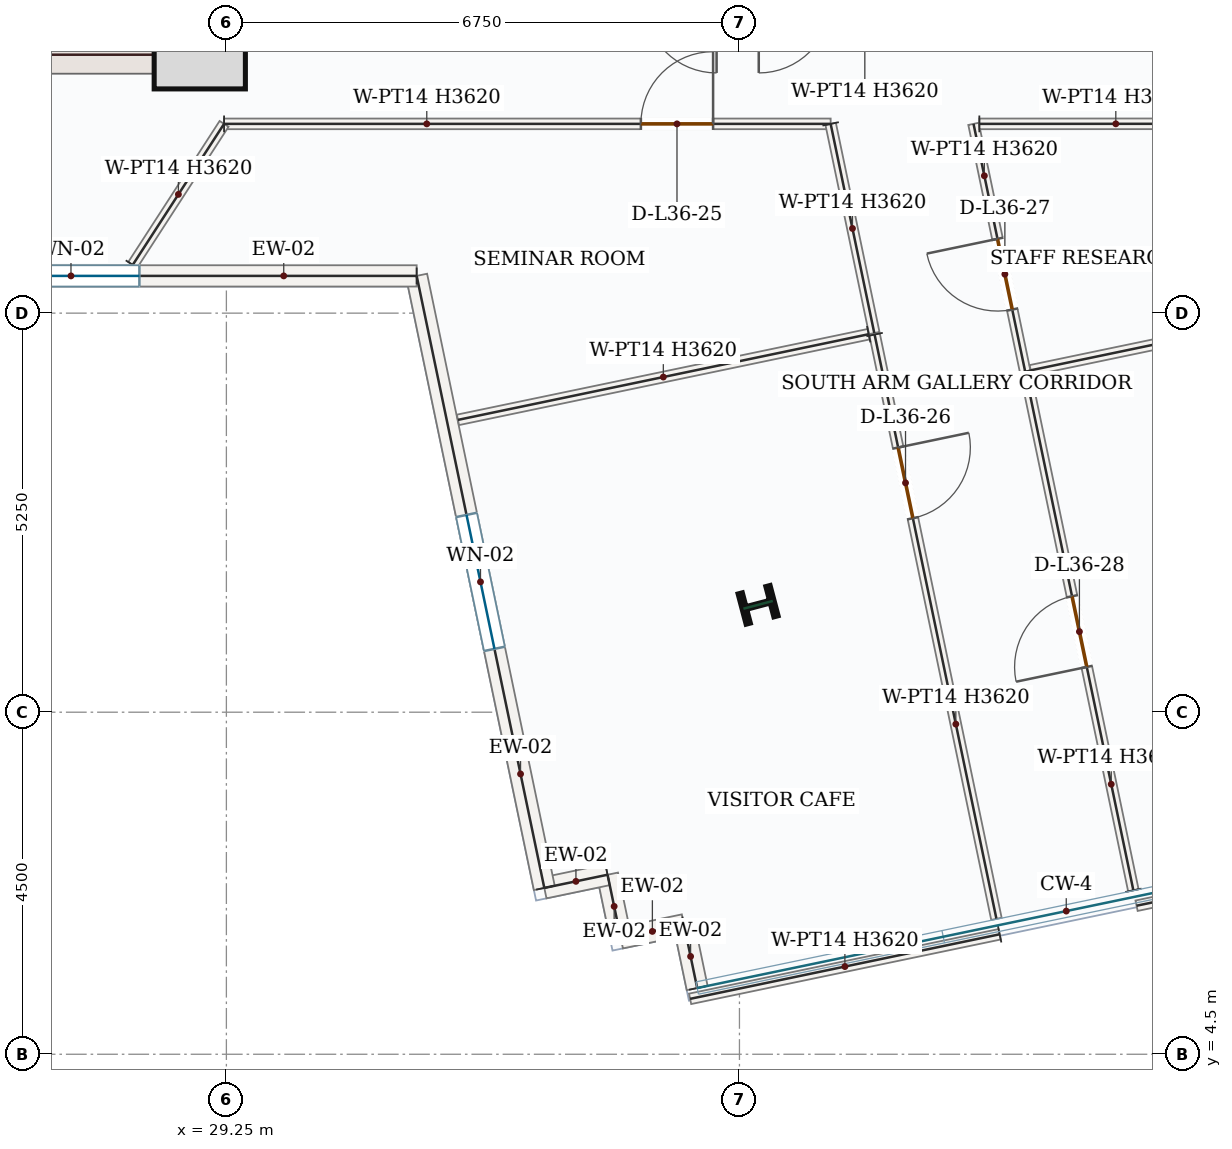
"""IFC4 building model, lengths in metres.
Left out: names, types, materials, properties, quantities, classifications, styles, units other than length and angle.
Written with IfcOpenShell. Run it as: python <this file> out.ifc"""

import sys

from ifc_helpers import new_model, si_unit, direction, frame, frame_2d, origin, origin_2d, place, context, subcontext, project, spatial, rectangle, i_section, extrude, source, transform, mapped, element, fill, save


model = new_model("IFC4")
c1 = context("Model", 3, precision=1e-05, world=origin(), true_north=direction((0.0, 1.0)))
c2 = subcontext(c1, "Body", "Model", "MODEL_VIEW")
j1 = project(units=[si_unit("LENGTHUNIT", "METRE"), si_unit("PLANEANGLEUNIT", "RADIAN")], contexts=[c1])
p1 = place(None, origin())
s1 = spatial("IfcSite", under=j1, at=p1, CompositionType="ELEMENT")
p2 = place(p1, origin())
s2 = spatial("IfcBuilding", under=s1, at=p2, CompositionType="ELEMENT")
p3 = place(p2, frame((0.0, 0.0, 159.0)))
s3 = spatial("IfcBuildingStorey", under=s2, at=p3, CompositionType="ELEMENT", Elevation=159.0)
p4 = place(p3, frame((29.0, 17.4, 0.0), z_axis=(0.0, 0.0, 1.0), x_axis=(0.0, 1.0, 0.0)))
e1 = element("IfcWall", 1, at=p4, inside=s3, PredefinedType="SHEAR", context=c2, shape_type="SweptSolid", body=[
    extrude(rectangle(XDim=8.55, YDim=0.5, at=frame_2d((4.275, 0.0))), origin(), (0.0, 0.0, 1.0), 3.62),
])
p5 = place(p4, frame((6.65, 0.0, 0.0)))
e2 = element("IfcOpeningElement", 2, at=p5, cuts=e1, PredefinedType="OPENING", context=c2, shape_type="SweptSolid", body=[
    extrude(rectangle(XDim=1.1, YDim=2.2, at=frame_2d((0.55, 1.1))), frame((0.0, 0.26, 0.0), z_axis=(0.0, -1.0, 0.0), x_axis=(1.0, 0.0, 0.0)), (0.0, 0.0, 1.0), 0.52),
])
p6 = place(p4, frame((2.15, 0.0, 0.0)))
e3 = element("IfcOpeningElement", 3, at=p6, cuts=e1, PredefinedType="OPENING", context=c2, shape_type="SweptSolid", body=[
    extrude(rectangle(XDim=0.88, YDim=2.1, at=frame_2d((0.44, 1.05))), frame((0.0, 0.26, 0.0), z_axis=(0.0, -1.0, 0.0), x_axis=(1.0, 0.0, 0.0)), (0.0, 0.0, 1.0), 0.52),
])
p7 = place(p4, frame((4.25, 0.0, 0.0)))
e4 = element("IfcOpeningElement", 4, at=p7, cuts=e1, PredefinedType="OPENING", context=c2, shape_type="SweptSolid", body=[
    extrude(rectangle(XDim=0.88, YDim=2.1, at=frame_2d((0.44, 1.05))), frame((0.0, 0.26, 0.0), z_axis=(0.0, -1.0, 0.0), x_axis=(1.0, 0.0, 0.0)), (0.0, 0.0, 1.0), 0.52),
])
m1 = source(origin(), c2, "Body", "SweptSolid", [
    extrude(rectangle(XDim=7.0, YDim=0.5, at=frame_2d((3.5, 0.0))), origin(), (0.0, 0.0, 1.0), 3.62),
])
p8 = place(p3, frame((21.75, 17.65, 0.0), z_axis=(0.0, 0.0, 1.0), x_axis=(1.0, 0.0, 0.0)))
e5 = element("IfcWall", 5, at=p8, inside=s3, PredefinedType="SHEAR", context=c2, shape_type="MappedRepresentation", body=[
    mapped(m1, transform((0.0, 0.0, 0.0), x_axis=(1.0, 0.0, 0.0), y_axis=(0.0, 1.0, 0.0), z_axis=(0.0, 0.0, 1.0), scale=1.0)),
])
m2 = source(origin(), c2, "Body", "SweptSolid", [
    extrude(rectangle(XDim=1.2, YDim=1.2, at=origin_2d()), origin(), (0.0, 0.0, 1.0), 3.9),
])
p9 = place(p3, frame((28.9, 17.8, 0.0), z_axis=(0.0, 0.0, 1.0), x_axis=(1.0, 0.0, 0.0)))
e6 = element("IfcColumn", 6, at=p9, inside=s3, PredefinedType="COLUMN", context=c2, shape_type="MappedRepresentation", body=[
    mapped(m2, transform((0.0, 0.0, 0.0), x_axis=(1.0, 0.0, 0.0), y_axis=(0.0, 1.0, 0.0), z_axis=(0.0, 0.0, 1.0), scale=1.0)),
])
m3 = source(origin(), c2, "Body", "SweptSolid", [
    extrude(i_section(OverallWidth=0.412, OverallDepth=0.435, WebThickness=0.036, FlangeThickness=0.057, FilletRadius=0.018, at=origin_2d()), origin(), (0.0, 0.0, 1.0), 3.9),
])
p10 = place(p3, frame((36.245, 10.412, 0.0), z_axis=(0.0, 0.0, 1.0), x_axis=(-0.255445757936, 0.966823388604, 0.0)))
e7 = element("IfcColumn", 7, at=p10, inside=s3, PredefinedType="COLUMN", context=c2, shape_type="MappedRepresentation", body=[
    mapped(m3, transform((0.0, 0.0, 0.0), x_axis=(1.0, 0.0, 0.0), y_axis=(0.0, 1.0, 0.0), z_axis=(0.0, 0.0, 1.0), scale=1.0)),
])
m4 = source(origin(), c2, "Body", "SweptSolid", [
    extrude(rectangle(XDim=0.85, YDim=0.28, at=frame_2d((0.425, 0.0))), origin(), (0.0, 0.0, 1.0), 3.62),
])
for number, where, z_axis, x_axis in (
    (8, (35.444, 5.371, 0.0), (0.0, 0.0, 1.0), (-0.204, 0.979, 0.0)),
    (9, (35.271, 6.203, 0.0), (0.0, 0.0, 1.0), (-0.979, -0.204, 0.0)),
    (10, (34.438, 6.03, 0.0), (0.0, 0.0, 1.0), (-0.204, 0.979, 0.0)),
):
    element("IfcWall", number, at=place(p3, frame(where, z_axis=z_axis, x_axis=x_axis)), inside=s3, PredefinedType="SOLIDWALL", context=c2, shape_type="MappedRepresentation", body=[
        mapped(m4, transform((0.0, 0.0, 0.0), x_axis=(1.0, 0.0, 0.0), y_axis=(0.0, 1.0, 0.0), z_axis=(0.0, 0.0, 1.0), scale=1.0)),
    ])
m5 = source(origin(), c2, "Body", "SweptSolid", [
    extrude(rectangle(XDim=0.85, YDim=0.28, at=frame_2d((0.425, 0.0))), origin(), (0.0, 0.0, 1.0), 3.62),
])
p11 = place(p3, frame((34.265, 6.862, 0.0), z_axis=(0.0, 0.0, 1.0), x_axis=(-0.97893500384, -0.204172128991, 0.0)))
e11 = element("IfcWall", 11, at=p11, inside=s3, PredefinedType="SOLIDWALL", context=c2, shape_type="MappedRepresentation", body=[
    mapped(m5, transform((0.0, 0.0, 0.0), x_axis=(1.0, 0.0, 0.0), y_axis=(0.0, 1.0, 0.0), z_axis=(0.0, 0.0, 1.0), scale=1.0)),
])
p12 = place(p3, frame((33.433, 6.688, 0.0), z_axis=(0.0, 0.0, 1.0), x_axis=(-0.204152195211, 0.978939161128, 0.0)))
e12 = element("IfcWall", 12, at=p12, inside=s3, PredefinedType="SOLIDWALL", context=c2, shape_type="SweptSolid", body=[
    extrude(rectangle(XDim=8.225, YDim=0.28, at=frame_2d((4.113, 0.0))), origin(), (0.0, 0.0, 1.0), 3.62),
])
p13 = place(p12, frame((3.213, 0.0, 0.85)))
e13 = element("IfcOpeningElement", 13, at=p13, cuts=e12, PredefinedType="OPENING", context=c2, shape_type="SweptSolid", body=[
    extrude(rectangle(XDim=1.8, YDim=1.75, at=frame_2d((0.9, 0.875))), frame((0.0, 0.15, 0.0), z_axis=(0.0, -1.0, 0.0), x_axis=(1.0, 0.0, 0.0)), (0.0, 0.0, 1.0), 0.3),
])
p14 = place(p3, frame((31.753, 14.74, 0.0), z_axis=(0.0, 0.0, 1.0), x_axis=(-1.0, 0.0, 0.0)))
e14 = element("IfcWall", 14, at=p14, inside=s3, PredefinedType="SOLIDWALL", context=c2, shape_type="SweptSolid", body=[
    extrude(rectangle(XDim=9.095, YDim=0.28, at=frame_2d((4.548, 0.0))), origin(), (0.0, 0.0, 1.0), 3.62),
])
p15 = place(p14, frame((3.648, 0.0, 0.85)))
e15 = element("IfcOpeningElement", 15, at=p15, cuts=e14, PredefinedType="OPENING", context=c2, shape_type="SweptSolid", body=[
    extrude(rectangle(XDim=1.8, YDim=1.75, at=frame_2d((0.9, 0.875))), frame((0.0, 0.15, 0.0), z_axis=(0.0, -1.0, 0.0), x_axis=(1.0, 0.0, 0.0)), (0.0, 0.0, 1.0), 0.3),
])
p16 = place(p3, frame((29.219, 16.74, 0.0), z_axis=(0.0, 0.0, 1.0), x_axis=(1.0, 0.0, 0.0)))
e16 = element("IfcWall", 16, at=p16, inside=s3, PredefinedType="PARTITIONING", context=c2, shape_type="SweptSolid", body=[
    extrude(rectangle(XDim=7.98, YDim=0.14, at=frame_2d((3.99, 0.0))), origin(), (0.0, 0.0, 1.0), 3.62),
])
p17 = place(p16, frame((5.484, 0.0, 0.0)))
e17 = element("IfcOpeningElement", 17, at=p17, cuts=e16, PredefinedType="OPENING", context=c2, shape_type="SweptSolid", body=[
    extrude(rectangle(XDim=0.95, YDim=2.15, at=frame_2d((0.475, 1.075))), frame((0.0, 0.08, 0.0), z_axis=(0.0, -1.0, 0.0), x_axis=(1.0, 0.0, 0.0)), (0.0, 0.0, 1.0), 0.16),
])
m6 = source(origin(), c2, "Body", "SweptSolid", [
    extrude(rectangle(XDim=2.811, YDim=0.14, at=frame_2d((1.406, 0.0))), origin(), (0.0, 0.0, 1.0), 3.62),
])
p18 = place(p3, frame((37.2, 16.74, 0.0), z_axis=(0.0, 0.0, 1.0), x_axis=(0.204092977776, -0.978951508719, 0.0)))
e18 = element("IfcWall", 18, at=p18, inside=s3, PredefinedType="PARTITIONING", context=c2, shape_type="MappedRepresentation", body=[
    mapped(m6, transform((0.0, 0.0, 0.0), x_axis=(1.0, 0.0, 0.0), y_axis=(0.0, 1.0, 0.0), z_axis=(0.0, 0.0, 1.0), scale=1.0)),
])
m7 = source(origin(), c2, "Body", "SweptSolid", [
    extrude(rectangle(XDim=5.52, YDim=0.14, at=frame_2d((2.76, 0.0))), origin(), (0.0, 0.0, 1.0), 3.62),
])
p19 = place(p3, frame((37.7, 13.973, 0.0), z_axis=(0.0, 0.0, 1.0), x_axis=(-0.978929612498, -0.204197976909, 0.0)))
e19 = element("IfcWall", 19, at=p19, inside=s3, PredefinedType="PARTITIONING", context=c2, shape_type="MappedRepresentation", body=[
    mapped(m7, transform((0.0, 0.0, 0.0), x_axis=(1.0, 0.0, 0.0), y_axis=(0.0, 1.0, 0.0), z_axis=(0.0, 0.0, 1.0), scale=1.0)),
])
m8 = source(origin(), c2, "Body", "SweptSolid", [
    extrude(rectangle(XDim=2.21, YDim=0.14, at=frame_2d((1.105, 0.0))), origin(), (0.0, 0.0, 1.0), 3.62),
])
p20 = place(p3, frame((28.018, 14.885, 0.0), z_axis=(0.0, 0.0, 1.0), x_axis=(0.543613077793, 0.83933594088, 0.0)))
e20 = element("IfcWall", 20, at=p20, inside=s3, PredefinedType="PARTITIONING", context=c2, shape_type="MappedRepresentation", body=[
    mapped(m8, transform((0.0, 0.0, 0.0), x_axis=(1.0, 0.0, 0.0), y_axis=(0.0, 1.0, 0.0), z_axis=(0.0, 0.0, 1.0), scale=1.0)),
])
p21 = place(p3, frame((39.759, 13.483, 0.0), z_axis=(0.0, 0.0, 1.0), x_axis=(-0.204124193585, 0.97894500029, 0.0)))
e21 = element("IfcWall", 21, at=p21, inside=s3, PredefinedType="PARTITIONING", context=c2, shape_type="SweptSolid", body=[
    extrude(rectangle(XDim=3.327, YDim=0.14, at=frame_2d((1.664, 0.0))), origin(), (0.0, 0.0, 1.0), 3.62),
])
p22 = place(p21, frame((0.832, 0.0, 0.0)))
e22 = element("IfcOpeningElement", 22, at=p22, cuts=e21, PredefinedType="OPENING", context=c2, shape_type="SweptSolid", body=[
    extrude(rectangle(XDim=0.95, YDim=2.15, at=frame_2d((0.475, 1.075))), frame((0.0, 0.08, 0.0), z_axis=(0.0, -1.0, 0.0), x_axis=(1.0, 0.0, 0.0)), (0.0, 0.0, 1.0), 0.16),
])
m9 = source(origin(), c2, "Body", "SweptSolid", [
    extrude(rectangle(XDim=3.591, YDim=0.14, at=frame_2d((1.795, 0.0))), origin(), (0.0, 0.0, 1.0), 3.079),
])
p23 = place(p3, frame((39.156, 16.74, 0.0), z_axis=(0.0, 0.0, 1.0), x_axis=(0.999999942209, 0.000339974142, 0.0)))
e23 = element("IfcWall", 23, at=p23, inside=s3, PredefinedType="PARTITIONING", context=c2, shape_type="MappedRepresentation", body=[
    mapped(m9, transform((0.0, 0.0, 0.0), x_axis=(1.0, 0.0, 0.0), y_axis=(0.0, 1.0, 0.0), z_axis=(0.0, 0.0, 1.0), scale=1.0)),
])
m10 = source(origin(), c2, "Body", "SweptSolid", [
    extrude(rectangle(XDim=5.52, YDim=0.14, at=frame_2d((2.76, 0.0))), origin(), (0.0, 0.0, 1.0), 3.079),
])
p24 = place(p3, frame((45.236, 14.625, 0.0), z_axis=(0.0, 0.0, 1.0), x_axis=(-0.97893845252, -0.204155593062, 0.0)))
e24 = element("IfcWall", 24, at=p24, inside=s3, PredefinedType="PARTITIONING", context=c2, shape_type="MappedRepresentation", body=[
    mapped(m10, transform((0.0, 0.0, 0.0), x_axis=(1.0, 0.0, 0.0), y_axis=(0.0, 1.0, 0.0), z_axis=(0.0, 0.0, 1.0), scale=1.0)),
])
m11 = source(origin(), c2, "Body", "SweptSolid", [
    extrude(rectangle(XDim=4.16, YDim=0.14, at=frame_2d((2.08, 0.0))), origin(), (0.0, 0.0, 1.0), 3.62),
])
p25 = place(p3, frame((45.297, 7.303, 0.0), z_axis=(0.0, 0.0, 1.0), x_axis=(-0.978935967244, -0.204167509744, 0.0)))
e25 = element("IfcWall", 25, at=p25, inside=s3, PredefinedType="PARTITIONING", context=c2, shape_type="MappedRepresentation", body=[
    mapped(m11, transform((0.0, 0.0, 0.0), x_axis=(1.0, 0.0, 0.0), y_axis=(0.0, 1.0, 0.0), z_axis=(0.0, 0.0, 1.0), scale=1.0)),
])
p26 = place(p3, frame((41.182, 6.657, 0.0), z_axis=(0.0, 0.0, 1.0), x_axis=(-0.204158980406, 0.97893774609, 0.0)))
e26 = element("IfcWall", 26, at=p26, inside=s3, PredefinedType="PARTITIONING", context=c2, shape_type="SweptSolid", body=[
    extrude(rectangle(XDim=6.953, YDim=0.14, at=frame_2d((3.476, 0.0))), origin(), (0.0, 0.0, 1.0), 3.62),
])
p27 = place(p26, frame((3.001, 0.0, 0.0)))
e27 = element("IfcOpeningElement", 27, at=p27, cuts=e26, PredefinedType="OPENING", context=c2, shape_type="SweptSolid", body=[
    extrude(rectangle(XDim=0.95, YDim=2.15, at=frame_2d((0.475, 1.075))), frame((0.0, 0.08, 0.0), z_axis=(0.0, -1.0, 0.0), x_axis=(1.0, 0.0, 0.0)), (0.0, 0.0, 1.0), 0.16),
])
p28 = place(p3, frame((37.778, 13.969, 0.0), z_axis=(0.0, 0.0, 1.0), x_axis=(0.204175249208, -0.978934353065, 0.0)))
e28 = element("IfcWall", 28, at=p28, inside=s3, PredefinedType="PARTITIONING", context=c2, shape_type="SweptSolid", body=[
    extrude(rectangle(XDim=7.853, YDim=0.14, at=frame_2d((3.926, 0.0))), origin(), (0.0, 0.0, 1.0), 3.62),
])
p29 = place(p28, frame((1.519, 0.0, 0.0)))
e29 = element("IfcOpeningElement", 29, at=p29, cuts=e28, PredefinedType="OPENING", context=c2, shape_type="SweptSolid", body=[
    extrude(rectangle(XDim=0.95, YDim=2.15, at=frame_2d((0.475, 1.075))), frame((0.0, 0.08, 0.0), z_axis=(0.0, -1.0, 0.0), x_axis=(1.0, 0.0, 0.0)), (0.0, 0.0, 1.0), 0.16),
])
m12 = source(origin(), c2, "Body", "SweptSolid", [
    extrude(rectangle(XDim=4.16, YDim=0.14, at=frame_2d((2.08, 0.0))), origin(), (0.0, 0.0, 1.0), 3.62),
])
p30 = place(p3, frame((39.423, 6.078, 0.0), z_axis=(0.0, 0.0, 1.0), x_axis=(-0.978945249929, -0.204122996358, 0.0)))
e30 = element("IfcWall", 30, at=p30, inside=s3, PredefinedType="PARTITIONING", context=c2, shape_type="MappedRepresentation", body=[
    mapped(m12, transform((0.0, 0.0, 0.0), x_axis=(1.0, 0.0, 0.0), y_axis=(0.0, 1.0, 0.0), z_axis=(0.0, 0.0, 1.0), scale=1.0)),
])
m13 = source(origin(), c2, "Body", "SweptSolid", [
    extrude(rectangle(XDim=1.8, YDim=1.75, at=frame_2d((0.9, 0.875))), frame((0.0, 0.03, 0.0), z_axis=(0.0, -1.0, 0.0), x_axis=(1.0, 0.0, 0.0)), (0.0, 0.0, 1.0), 0.06),
])
p31 = place(p13, origin())
e31 = element("IfcWindow", 31, at=p31, inside=s3, PartitioningType="DOUBLE_PANEL_VERTICAL", PredefinedType="WINDOW", context=c2, shape_type="MappedRepresentation", body=[
    mapped(m13, transform((0.0, 0.0, 0.0), x_axis=(1.0, 0.0, 0.0), y_axis=(0.0, 1.0, 0.0), z_axis=(0.0, 0.0, 1.0), scale=1.0)),
])
fill(e13, e31)
p32 = place(p15, origin())
e32 = element("IfcWindow", 32, at=p32, inside=s3, PartitioningType="DOUBLE_PANEL_VERTICAL", PredefinedType="WINDOW", context=c2, shape_type="MappedRepresentation", body=[
    mapped(m13, transform((0.0, 0.0, 0.0), x_axis=(1.0, 0.0, 0.0), y_axis=(0.0, 1.0, 0.0), z_axis=(0.0, 0.0, 1.0), scale=1.0)),
])
fill(e15, e32)
m14 = source(origin(), c2, "Body", "SweptSolid", [
    extrude(rectangle(XDim=0.95, YDim=2.15, at=frame_2d((0.475, 1.075))), frame((0.0, 0.025, 0.0), z_axis=(0.0, -1.0, 0.0), x_axis=(1.0, 0.0, 0.0)), (0.0, 0.0, 1.0), 0.05),
])
p33 = place(p17, origin())
e33 = element("IfcDoor", 33, at=p33, inside=s3, OperationType="SINGLE_SWING_RIGHT", PredefinedType="DOOR", context=c2, shape_type="MappedRepresentation", body=[
    mapped(m14, transform((0.0, 0.0, 0.0), x_axis=(1.0, 0.0, 0.0), y_axis=(0.0, 1.0, 0.0), z_axis=(0.0, 0.0, 1.0), scale=1.0)),
])
fill(e17, e33)
p34 = place(p29, origin())
e34 = element("IfcDoor", 34, at=p34, inside=s3, OperationType="SINGLE_SWING_LEFT", PredefinedType="DOOR", context=c2, shape_type="MappedRepresentation", body=[
    mapped(m14, transform((0.0, 0.0, 0.0), x_axis=(1.0, 0.0, 0.0), y_axis=(0.0, 1.0, 0.0), z_axis=(0.0, 0.0, 1.0), scale=1.0)),
])
fill(e29, e34)
p35 = place(p22, origin())
e35 = element("IfcDoor", 35, at=p35, inside=s3, OperationType="SINGLE_SWING_RIGHT", PredefinedType="DOOR", context=c2, shape_type="MappedRepresentation", body=[
    mapped(m14, transform((0.0, 0.0, 0.0), x_axis=(1.0, 0.0, 0.0), y_axis=(0.0, 1.0, 0.0), z_axis=(0.0, 0.0, 1.0), scale=1.0)),
])
fill(e22, e35)
p36 = place(p27, origin())
e36 = element("IfcDoor", 36, at=p36, inside=s3, OperationType="SINGLE_SWING_LEFT", PredefinedType="DOOR", context=c2, shape_type="MappedRepresentation", body=[
    mapped(m14, transform((0.0, 0.0, 0.0), x_axis=(1.0, 0.0, 0.0), y_axis=(0.0, 1.0, 0.0), z_axis=(0.0, 0.0, 1.0), scale=1.0)),
])
fill(e27, e36)
save(model, sys.argv[1])
